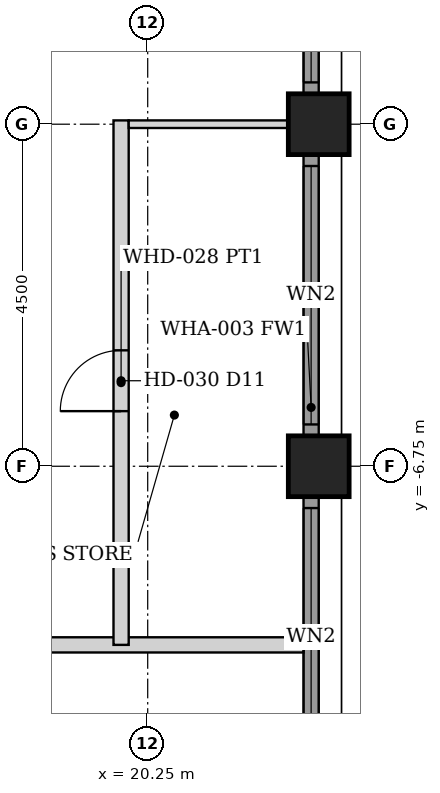
"""IFC4 building model, lengths in metres.
Left out: names, types, materials, properties, quantities, classifications, styles, units other than length and angle.
Written with IfcOpenShell. Run it as: python <this file> out.ifc"""

import sys

from ifc_helpers import new_model, si_unit, direction, frame, frame_2d, origin, origin_2d, place, context, subcontext, project, spatial, rectangle, hollow_rectangle, extrude, element, fill, save


model = new_model("IFC4")
c1 = context("Model", 3, precision=1e-05, world=origin(), true_north=direction((0.0, 1.0)))
c2 = subcontext(c1, "Body", "Model", "MODEL_VIEW")
j1 = project(units=[si_unit("LENGTHUNIT", "METRE"), si_unit("PLANEANGLEUNIT", "RADIAN")], contexts=[c1])
p1 = place(None, origin())
s1 = spatial("IfcSite", under=j1, at=p1, CompositionType="ELEMENT")
p2 = place(p1, origin())
s2 = spatial("IfcBuilding", under=s1, at=p2, CompositionType="ELEMENT")
p3 = place(p2, frame((0.0, 0.0, 150.8)))
s3 = spatial("IfcBuildingStorey", under=s2, at=p3, CompositionType="ELEMENT", Elevation=150.8)
for number, where, z_axis, x_axis in (
    (1, (22.5, -6.75, 0.0), (0.0, 0.0, 1.0), (1.0, 0.0, 0.0)),
    (2, (22.5, -2.25, 0.0), (0.0, 0.0, 1.0), (1.0, 0.0, 0.0)),
):
    element("IfcColumn", number, at=place(p3, frame(where, z_axis=z_axis, x_axis=x_axis)), inside=s3, PredefinedType="COLUMN", context=c2, shape_type="SweptSolid", body=[
        extrude(hollow_rectangle(XDim=0.8, YDim=0.8, WallThickness=0.05, at=origin_2d()), origin(), (0.0, 0.0, 1.0), 3.6),
    ])
p4 = place(p3, frame((22.4, -10.845, 0.0), z_axis=(0.0, 0.0, 1.0), x_axis=(0.0, 1.0, 0.0)))
e3 = element("IfcWall", 3, at=p4, inside=s3, PredefinedType="SOLIDWALL", context=c2, shape_type="SweptSolid", body=[
    extrude(rectangle(XDim=3.69, YDim=0.2, at=frame_2d((1.845, 0.0))), origin(), (0.0, 0.0, 1.0), 2.479),
])
p5 = place(p4, frame((0.145, 0.0, 0.3)))
e4 = element("IfcOpeningElement", 4, at=p5, cuts=e3, PredefinedType="OPENING", context=c2, shape_type="SweptSolid", body=[
    extrude(rectangle(XDim=3.4, YDim=2.029, at=frame_2d((1.7, 1.015))), frame((0.0, 0.11, 0.0), z_axis=(0.0, -1.0, 0.0), x_axis=(1.0, 0.0, 0.0)), (0.0, 0.0, 1.0), 0.22),
])
p6 = place(p3, frame((22.4, -6.345, 0.0), z_axis=(0.0, 0.0, 1.0), x_axis=(0.0, 1.0, 0.0)))
e5 = element("IfcWall", 5, at=p6, inside=s3, PredefinedType="SOLIDWALL", context=c2, shape_type="SweptSolid", body=[
    extrude(rectangle(XDim=3.69, YDim=0.2, at=frame_2d((1.845, 0.0))), origin(), (0.0, 0.0, 1.0), 2.479),
])
p7 = place(p6, frame((0.145, 0.0, 0.3)))
e6 = element("IfcOpeningElement", 6, at=p7, cuts=e5, PredefinedType="OPENING", context=c2, shape_type="SweptSolid", body=[
    extrude(rectangle(XDim=3.4, YDim=2.029, at=frame_2d((1.7, 1.015))), frame((0.0, 0.11, 0.0), z_axis=(0.0, -1.0, 0.0), x_axis=(1.0, 0.0, 0.0)), (0.0, 0.0, 1.0), 0.22),
])
p8 = place(p3, frame((22.4, -1.845, 0.0), z_axis=(0.0, 0.0, 1.0), x_axis=(0.0, 1.0, 0.0)))
e7 = element("IfcWall", 7, at=p8, inside=s3, PredefinedType="SOLIDWALL", context=c2, shape_type="SweptSolid", body=[
    extrude(rectangle(XDim=3.69, YDim=0.2, at=frame_2d((1.845, 0.0))), origin(), (0.0, 0.0, 1.0), 2.479),
])
p9 = place(p8, frame((0.145, 0.0, 0.3)))
e8 = element("IfcOpeningElement", 8, at=p9, cuts=e7, PredefinedType="OPENING", context=c2, shape_type="SweptSolid", body=[
    extrude(rectangle(XDim=3.4, YDim=2.029, at=frame_2d((1.7, 1.015))), frame((0.0, 0.11, 0.0), z_axis=(0.0, -1.0, 0.0), x_axis=(1.0, 0.0, 0.0)), (0.0, 0.0, 1.0), 0.22),
])
p10 = place(p3, frame((-22.3, -9.1, 0.0), z_axis=(0.0, 0.0, 1.0), x_axis=(1.0, 0.0, 0.0)))
e9 = element("IfcWall", 9, at=p10, inside=s3, PredefinedType="PARTITIONING", context=c2, shape_type="SweptSolid", body=[
    extrude(rectangle(XDim=44.6, YDim=0.2, at=frame_2d((22.3, 0.0))), origin(), (0.0, 0.0, 1.0), 2.473),
])
p11 = place(p10, frame((6.75, 0.0, 0.0)))
e10 = element("IfcOpeningElement", 10, at=p11, cuts=e9, PredefinedType="OPENING", context=c2, shape_type="SweptSolid", body=[
    extrude(rectangle(XDim=0.9, YDim=2.1, at=frame_2d((0.45, 1.05))), frame((0.0, 0.11, 0.0), z_axis=(0.0, -1.0, 0.0), x_axis=(1.0, 0.0, 0.0)), (0.0, 0.0, 1.0), 0.22),
])
p12 = place(p10, frame((15.75, 0.0, 0.0)))
e11 = element("IfcOpeningElement", 11, at=p12, cuts=e9, PredefinedType="OPENING", context=c2, shape_type="SweptSolid", body=[
    extrude(rectangle(XDim=0.9, YDim=2.1, at=frame_2d((0.45, 1.05))), frame((0.0, 0.11, 0.0), z_axis=(0.0, -1.0, 0.0), x_axis=(1.0, 0.0, 0.0)), (0.0, 0.0, 1.0), 0.22),
])
p13 = place(p10, frame((23.45, 0.0, 0.0)))
e12 = element("IfcOpeningElement", 12, at=p13, cuts=e9, PredefinedType="OPENING", context=c2, shape_type="SweptSolid", body=[
    extrude(rectangle(XDim=0.9, YDim=2.1, at=frame_2d((0.45, 1.05))), frame((0.0, 0.11, 0.0), z_axis=(0.0, -1.0, 0.0), x_axis=(1.0, 0.0, 0.0)), (0.0, 0.0, 1.0), 0.22),
])
p14 = place(p10, frame((24.75, 0.0, 0.0)))
e13 = element("IfcOpeningElement", 13, at=p14, cuts=e9, PredefinedType="OPENING", context=c2, shape_type="SweptSolid", body=[
    extrude(rectangle(XDim=0.9, YDim=2.1, at=frame_2d((0.45, 1.05))), frame((0.0, 0.11, 0.0), z_axis=(0.0, -1.0, 0.0), x_axis=(1.0, 0.0, 0.0)), (0.0, 0.0, 1.0), 0.22),
])
p15 = place(p10, frame((36.95, 0.0, 0.0)))
e14 = element("IfcOpeningElement", 14, at=p15, cuts=e9, PredefinedType="OPENING", context=c2, shape_type="SweptSolid", body=[
    extrude(rectangle(XDim=0.9, YDim=2.1, at=frame_2d((0.45, 1.05))), frame((0.0, 0.11, 0.0), z_axis=(0.0, -1.0, 0.0), x_axis=(1.0, 0.0, 0.0)), (0.0, 0.0, 1.0), 0.22),
])
p16 = place(p10, frame((38.85, 0.0, 0.0)))
e15 = element("IfcOpeningElement", 15, at=p16, cuts=e9, PredefinedType="OPENING", context=c2, shape_type="SweptSolid", body=[
    extrude(rectangle(XDim=0.9, YDim=2.1, at=frame_2d((0.45, 1.05))), frame((0.0, 0.11, 0.0), z_axis=(0.0, -1.0, 0.0), x_axis=(1.0, 0.0, 0.0)), (0.0, 0.0, 1.0), 0.22),
])
p17 = place(p10, frame((4.85, 0.0, 0.0)))
e16 = element("IfcOpeningElement", 16, at=p17, cuts=e9, PredefinedType="OPENING", context=c2, shape_type="SweptSolid", body=[
    extrude(rectangle(XDim=0.9, YDim=2.1, at=frame_2d((0.45, 1.05))), frame((0.0, 0.11, 0.0), z_axis=(0.0, -1.0, 0.0), x_axis=(1.0, 0.0, 0.0)), (0.0, 0.0, 1.0), 0.22),
])
p18 = place(p3, frame((19.9, -9.1, 0.0), z_axis=(0.0, 0.0, 1.0), x_axis=(0.0, 1.0, 0.0)))
e17 = element("IfcWall", 17, at=p18, inside=s3, PredefinedType="PARTITIONING", context=c2, shape_type="SweptSolid", body=[
    extrude(rectangle(XDim=6.9, YDim=0.2, at=frame_2d((3.45, 0.0))), origin(), (0.0, 0.0, 1.0), 2.473),
])
p19 = place(p18, frame((3.075, 0.0, 0.0)))
e18 = element("IfcOpeningElement", 18, at=p19, cuts=e17, PredefinedType="OPENING", context=c2, shape_type="SweptSolid", body=[
    extrude(rectangle(XDim=0.8, YDim=2.1, at=frame_2d((0.4, 1.05))), frame((0.0, 0.11, 0.0), z_axis=(0.0, -1.0, 0.0), x_axis=(1.0, 0.0, 0.0)), (0.0, 0.0, 1.0), 0.22),
])
p20 = place(p3, frame((20.0, -2.25, 0.0), z_axis=(0.0, 0.0, 1.0), x_axis=(1.0, 0.0, 0.0)))
e19 = element("IfcWall", 19, at=p20, inside=s3, PredefinedType="PARTITIONING", context=c2, shape_type="SweptSolid", body=[
    extrude(rectangle(XDim=2.1, YDim=0.1, at=frame_2d((1.05, 0.0))), origin(), (0.0, 0.0, 1.0), 2.473),
])
p21 = place(p5, origin())
e20 = element("IfcWindow", 20, at=p21, inside=s3, PartitioningType="SINGLE_PANEL", PredefinedType="WINDOW", context=c2, shape_type="SweptSolid", body=[
    extrude(rectangle(XDim=3.4, YDim=2.029, at=frame_2d((1.7, 1.015))), frame((0.0, 0.03, 0.0), z_axis=(0.0, -1.0, 0.0), x_axis=(1.0, 0.0, 0.0)), (0.0, 0.0, 1.0), 0.06),
])
fill(e4, e20)
p22 = place(p7, origin())
e21 = element("IfcWindow", 21, at=p22, inside=s3, PartitioningType="SINGLE_PANEL", PredefinedType="WINDOW", context=c2, shape_type="SweptSolid", body=[
    extrude(rectangle(XDim=3.4, YDim=2.029, at=frame_2d((1.7, 1.015))), frame((0.0, 0.03, 0.0), z_axis=(0.0, -1.0, 0.0), x_axis=(1.0, 0.0, 0.0)), (0.0, 0.0, 1.0), 0.06),
])
fill(e6, e21)
p23 = place(p9, origin())
e22 = element("IfcWindow", 22, at=p23, inside=s3, PartitioningType="SINGLE_PANEL", PredefinedType="WINDOW", context=c2, shape_type="SweptSolid", body=[
    extrude(rectangle(XDim=3.4, YDim=2.029, at=frame_2d((1.7, 1.015))), frame((0.0, 0.03, 0.0), z_axis=(0.0, -1.0, 0.0), x_axis=(1.0, 0.0, 0.0)), (0.0, 0.0, 1.0), 0.06),
])
fill(e8, e22)
p24 = place(p19, origin())
e23 = element("IfcDoor", 23, at=p24, inside=s3, OperationType="SINGLE_SWING_LEFT", PredefinedType="DOOR", context=c2, shape_type="SweptSolid", body=[
    extrude(rectangle(XDim=0.8, YDim=2.1, at=frame_2d((0.4, 1.05))), frame((0.0, 0.025, 0.0), z_axis=(0.0, -1.0, 0.0), x_axis=(1.0, 0.0, 0.0)), (0.0, 0.0, 1.0), 0.05),
])
fill(e18, e23)
save(model, sys.argv[1])
